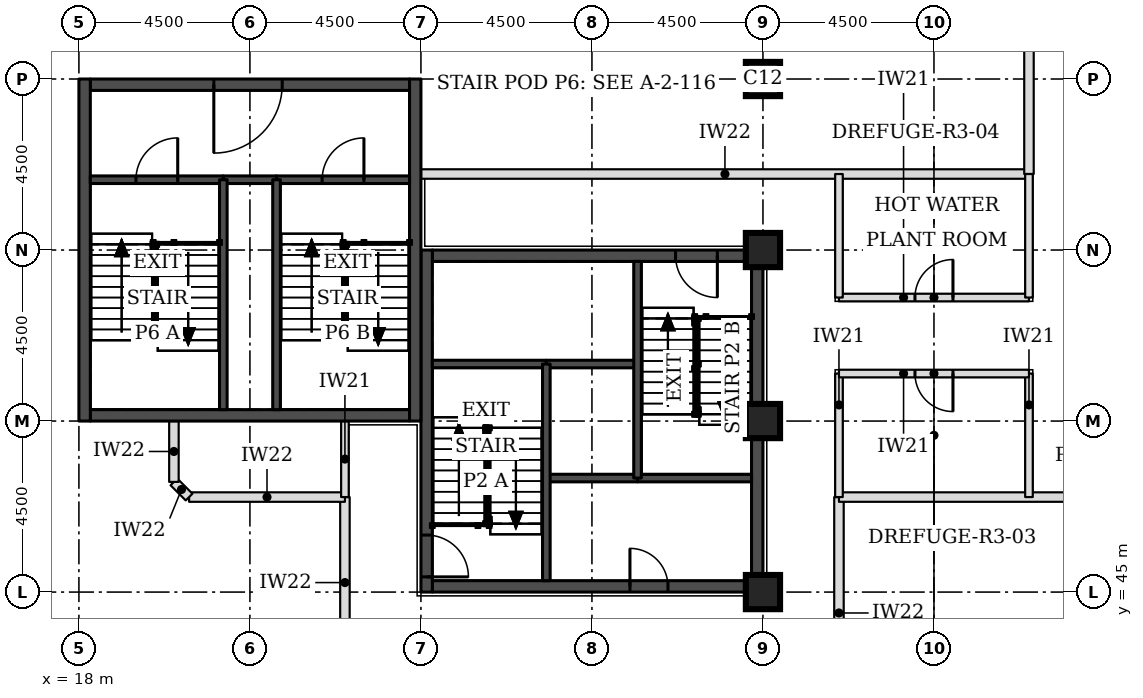
"""IFC4 building model, lengths in metres.
Left out: names, types, materials, properties, quantities, classifications, styles, units other than length and angle.
Written with IfcOpenShell. Run it as: python <this file> out.ifc"""

import sys

from ifc_helpers import new_model, si_unit, direction, frame, frame_2d, origin, origin_2d, place, context, subcontext, project, spatial, rectangle, extrude, element, fill, save


model = new_model("IFC4")
c1 = context("Model", 3, precision=1e-05, world=origin(), true_north=direction((0.0, 1.0)))
c2 = subcontext(c1, "Body", "Model", "MODEL_VIEW")
j1 = project(units=[si_unit("LENGTHUNIT", "METRE"), si_unit("PLANEANGLEUNIT", "RADIAN")], contexts=[c1])
p1 = place(None, origin())
s1 = spatial("IfcSite", under=j1, at=p1, CompositionType="ELEMENT")
p2 = place(p1, origin())
s2 = spatial("IfcBuilding", under=s1, at=p2, CompositionType="ELEMENT")
p3 = place(p2, frame((0.0, 0.0, 206.9)))
s3 = spatial("IfcBuildingStorey", under=s2, at=p3, CompositionType="ELEMENT", Elevation=206.9)
for number, where, z_axis, x_axis in (
    (1, (36.0, 45.0, 0.0), (0.0, 0.0, 1.0), (1.0, 0.0, 0.0)),
    (2, (36.0, 49.5, 0.0), (0.0, 0.0, 1.0), (1.0, 0.0, 0.0)),
    (3, (36.0, 54.0, 0.0), (0.0, 0.0, 1.0), (1.0, 0.0, 0.0)),
    (4, (36.0, 58.5, 0.0), (0.0, 0.0, 1.0), (1.0, 0.0, 0.0)),
):
    element("IfcColumn", number, at=place(p3, frame(where, z_axis=z_axis, x_axis=x_axis)), inside=s3, PredefinedType="COLUMN", context=c2, shape_type="SweptSolid", body=[
        extrude(rectangle(XDim=0.9, YDim=0.9, at=origin_2d()), origin(), (0.0, 0.0, 1.0), 5.0),
    ])
p4 = place(p3, frame((27.3, 45.15, 0.0), z_axis=(0.0, 0.0, 1.0), x_axis=(1.0, 0.0, 0.0)))
e5 = element("IfcWall", 5, at=p4, inside=s3, PredefinedType="SHEAR", context=c2, shape_type="SweptSolid", body=[
    extrude(rectangle(XDim=8.4, YDim=0.3, at=frame_2d((4.2, 0.0))), origin(), (0.0, 0.0, 1.0), 5.0),
])
p5 = place(p4, frame((5.2, 0.0, 0.0)))
e6 = element("IfcOpeningElement", 6, at=p5, cuts=e5, PredefinedType="OPENING", context=c2, shape_type="SweptSolid", body=[
    extrude(rectangle(XDim=1.0, YDim=2.1, at=frame_2d((0.5, 1.05))), frame((0.0, 0.16, 0.0), z_axis=(0.0, -1.0, 0.0), x_axis=(1.0, 0.0, 0.0)), (0.0, 0.0, 1.0), 0.32),
])
p6 = place(p3, frame((27.3, 53.85, 0.0), z_axis=(0.0, 0.0, 1.0), x_axis=(1.0, 0.0, 0.0)))
e7 = element("IfcWall", 7, at=p6, inside=s3, PredefinedType="SHEAR", context=c2, shape_type="SweptSolid", body=[
    extrude(rectangle(XDim=8.4, YDim=0.3, at=frame_2d((4.2, 0.0))), origin(), (0.0, 0.0, 1.0), 5.0),
])
p7 = place(p6, frame((6.4, 0.0, 0.0)))
e8 = element("IfcOpeningElement", 8, at=p7, cuts=e7, PredefinedType="OPENING", context=c2, shape_type="SweptSolid", body=[
    extrude(rectangle(XDim=1.1, YDim=2.1, at=frame_2d((0.55, 1.05))), frame((0.0, 0.16, 0.0), z_axis=(0.0, -1.0, 0.0), x_axis=(1.0, 0.0, 0.0)), (0.0, 0.0, 1.0), 0.32),
])
p8 = place(p3, frame((27.15, 45.0, 0.0), z_axis=(0.0, 0.0, 1.0), x_axis=(0.0, 1.0, 0.0)))
e9 = element("IfcWall", 9, at=p8, inside=s3, PredefinedType="SHEAR", context=c2, shape_type="SweptSolid", body=[
    extrude(rectangle(XDim=9.0, YDim=0.3, at=frame_2d((4.5, 0.0))), origin(), (0.0, 0.0, 1.0), 5.0),
])
p9 = place(p8, frame((0.4, 0.0, 0.0)))
e10 = element("IfcOpeningElement", 10, at=p9, cuts=e9, PredefinedType="OPENING", context=c2, shape_type="SweptSolid", body=[
    extrude(rectangle(XDim=1.1, YDim=2.1, at=frame_2d((0.55, 1.05))), frame((0.0, 0.16, 0.0), z_axis=(0.0, -1.0, 0.0), x_axis=(1.0, 0.0, 0.0)), (0.0, 0.0, 1.0), 0.32),
])
p10 = place(p3, frame((35.85, 45.0, 0.0), z_axis=(0.0, 0.0, 1.0), x_axis=(0.0, 1.0, 0.0)))
e11 = element("IfcWall", 11, at=p10, inside=s3, PredefinedType="SHEAR", context=c2, shape_type="SweptSolid", body=[
    extrude(rectangle(XDim=9.0, YDim=0.3, at=frame_2d((4.5, 0.0))), origin(), (0.0, 0.0, 1.0), 5.0),
])
p11 = place(p3, frame((18.3, 49.65, 0.0), z_axis=(0.0, 0.0, 1.0), x_axis=(1.0, 0.0, 0.0)))
e12 = element("IfcWall", 12, at=p11, inside=s3, PredefinedType="SHEAR", context=c2, shape_type="SweptSolid", body=[
    extrude(rectangle(XDim=8.4, YDim=0.3, at=frame_2d((4.2, 0.0))), origin(), (0.0, 0.0, 1.0), 5.0),
])
p12 = place(p3, frame((18.3, 58.35, 0.0), z_axis=(0.0, 0.0, 1.0), x_axis=(1.0, 0.0, 0.0)))
e13 = element("IfcWall", 13, at=p12, inside=s3, PredefinedType="SHEAR", context=c2, shape_type="SweptSolid", body=[
    extrude(rectangle(XDim=8.4, YDim=0.3, at=frame_2d((4.2, 0.0))), origin(), (0.0, 0.0, 1.0), 5.0),
])
p13 = place(p12, frame((3.25, 0.0, 0.0)))
e14 = element("IfcOpeningElement", 14, at=p13, cuts=e13, PredefinedType="OPENING", context=c2, shape_type="SweptSolid", body=[
    extrude(rectangle(XDim=1.8, YDim=2.1, at=frame_2d((0.9, 1.05))), frame((0.0, 0.16, 0.0), z_axis=(0.0, -1.0, 0.0), x_axis=(1.0, 0.0, 0.0)), (0.0, 0.0, 1.0), 0.32),
])
for number, where, z_axis, x_axis in (
    (15, (18.15, 49.5, 0.0), (0.0, 0.0, 1.0), (0.0, 1.0, 0.0)),
    (16, (26.85, 49.5, 0.0), (0.0, 0.0, 1.0), (0.0, 1.0, 0.0)),
):
    element("IfcWall", number, at=place(p3, frame(where, z_axis=z_axis, x_axis=x_axis)), inside=s3, PredefinedType="SHEAR", context=c2, shape_type="SweptSolid", body=[
        extrude(rectangle(XDim=9.0, YDim=0.3, at=frame_2d((4.5, 0.0))), origin(), (0.0, 0.0, 1.0), 5.0),
    ])
for number, where, z_axis, x_axis in (
    (17, (25.0, 43.0, 0.0), (0.0, 0.0, 1.0), (0.0, 1.0, 0.0)),
    (18, (38.0, 43.0, 0.0), (0.0, 0.0, 1.0), (0.0, 1.0, 0.0)),
):
    element("IfcWall", number, at=place(p3, frame(where, z_axis=z_axis, x_axis=x_axis)), inside=s3, PredefinedType="PARTITIONING", context=c2, shape_type="SweptSolid", body=[
        extrude(rectangle(XDim=4.5, YDim=0.25, at=frame_2d((2.25, 0.0))), origin(), (0.0, 0.0, 1.0), 4.85),
    ])
p14 = place(p3, frame((20.899, 47.5, 0.0), z_axis=(0.0, 0.0, 1.0), x_axis=(1.0, 0.0, 0.0)))
e19 = element("IfcWall", 19, at=p14, inside=s3, PredefinedType="PARTITIONING", context=c2, shape_type="SweptSolid", body=[
    extrude(rectangle(XDim=4.101, YDim=0.25, at=frame_2d((2.051, 0.0))), origin(), (0.0, 0.0, 1.0), 4.85),
])
p15 = place(p3, frame((38.0, 47.5, 0.0), z_axis=(0.0, 0.0, 1.0), x_axis=(1.0, 0.0, 0.0)))
e20 = element("IfcWall", 20, at=p15, inside=s3, PredefinedType="PARTITIONING", context=c2, shape_type="SweptSolid", body=[
    extrude(rectangle(XDim=31.5, YDim=0.25, at=frame_2d((15.75, 0.0))), origin(), (0.0, 0.0, 1.0), 4.85),
])
p16 = place(p3, frame((20.5, 47.899, 0.0), z_axis=(0.0, 0.0, 1.0), x_axis=(0.707106781187, -0.707106781187, 0.0)))
e21 = element("IfcWall", 21, at=p16, inside=s3, PredefinedType="PARTITIONING", context=c2, shape_type="SweptSolid", body=[
    extrude(rectangle(XDim=0.564, YDim=0.25, at=frame_2d((0.282, 0.0))), origin(), (0.0, 0.0, 1.0), 4.85),
])
p17 = place(p3, frame((20.5, 47.899, 0.0), z_axis=(0.0, 0.0, 1.0), x_axis=(0.0, 1.0, 0.0)))
e22 = element("IfcWall", 22, at=p17, inside=s3, PredefinedType="PARTITIONING", context=c2, shape_type="SweptSolid", body=[
    extrude(rectangle(XDim=1.601, YDim=0.25, at=frame_2d((0.801, 0.0))), origin(), (0.0, 0.0, 1.0), 4.85),
])
p18 = place(p3, frame((27.0, 56.0, 0.0), z_axis=(0.0, 0.0, 1.0), x_axis=(1.0, 0.0, 0.0)))
e23 = element("IfcWall", 23, at=p18, inside=s3, PredefinedType="PARTITIONING", context=c2, shape_type="SweptSolid", body=[
    extrude(rectangle(XDim=16.0, YDim=0.25, at=frame_2d((8.0, 0.0))), origin(), (0.0, 0.0, 1.0), 4.85),
])
p19 = place(p3, frame((43.0, 56.0, 0.0), z_axis=(0.0, 0.0, 1.0), x_axis=(0.0, 1.0, 0.0)))
e24 = element("IfcWall", 24, at=p19, inside=s3, PredefinedType="PARTITIONING", context=c2, shape_type="SweptSolid", body=[
    extrude(rectangle(XDim=18.0, YDim=0.25, at=frame_2d((9.0, 0.0))), origin(), (0.0, 0.0, 1.0), 4.85),
])
p20 = place(p3, frame((25.0, 47.5, 0.0), z_axis=(0.0, 0.0, 1.0), x_axis=(0.0, 1.0, 0.0)))
e25 = element("IfcWall", 25, at=p20, inside=s3, PredefinedType="PARTITIONING", context=c2, shape_type="SweptSolid", body=[
    extrude(rectangle(XDim=2.0, YDim=0.2, at=frame_2d((1.0, 0.0))), origin(), (0.0, 0.0, 1.0), 4.85),
])
for number, where, z_axis, x_axis in (
    (26, (38.0, 47.5, 0.0), (0.0, 0.0, 1.0), (0.0, 1.0, 0.0)),
    (27, (43.0, 47.5, 0.0), (0.0, 0.0, 1.0), (0.0, 1.0, 0.0)),
):
    element("IfcWall", number, at=place(p3, frame(where, z_axis=z_axis, x_axis=x_axis)), inside=s3, PredefinedType="PARTITIONING", context=c2, shape_type="SweptSolid", body=[
        extrude(rectangle(XDim=3.25, YDim=0.2, at=frame_2d((1.625, 0.0))), origin(), (0.0, 0.0, 1.0), 4.85),
    ])
p21 = place(p3, frame((38.0, 50.75, 0.0), z_axis=(0.0, 0.0, 1.0), x_axis=(1.0, 0.0, 0.0)))
e28 = element("IfcWall", 28, at=p21, inside=s3, PredefinedType="PARTITIONING", context=c2, shape_type="SweptSolid", body=[
    extrude(rectangle(XDim=5.0, YDim=0.2, at=frame_2d((2.5, 0.0))), origin(), (0.0, 0.0, 1.0), 4.85),
])
p22 = place(p21, frame((2.0, 0.0, 0.0)))
e29 = element("IfcOpeningElement", 29, at=p22, cuts=e28, PredefinedType="OPENING", context=c2, shape_type="SweptSolid", body=[
    extrude(rectangle(XDim=1.0, YDim=2.1, at=frame_2d((0.5, 1.05))), frame((0.0, 0.11, 0.0), z_axis=(0.0, -1.0, 0.0), x_axis=(1.0, 0.0, 0.0)), (0.0, 0.0, 1.0), 0.22),
])
p23 = place(p3, frame((38.0, 52.75, 0.0), z_axis=(0.0, 0.0, 1.0), x_axis=(1.0, 0.0, 0.0)))
e30 = element("IfcWall", 30, at=p23, inside=s3, PredefinedType="PARTITIONING", context=c2, shape_type="SweptSolid", body=[
    extrude(rectangle(XDim=5.0, YDim=0.2, at=frame_2d((2.5, 0.0))), origin(), (0.0, 0.0, 1.0), 4.85),
])
p24 = place(p23, frame((2.0, 0.0, 0.0)))
e31 = element("IfcOpeningElement", 31, at=p24, cuts=e30, PredefinedType="OPENING", context=c2, shape_type="SweptSolid", body=[
    extrude(rectangle(XDim=1.0, YDim=2.1, at=frame_2d((0.5, 1.05))), frame((0.0, 0.11, 0.0), z_axis=(0.0, -1.0, 0.0), x_axis=(1.0, 0.0, 0.0)), (0.0, 0.0, 1.0), 0.22),
])
for number, where, z_axis, x_axis in (
    (32, (38.0, 52.75, 0.0), (0.0, 0.0, 1.0), (0.0, 1.0, 0.0)),
    (33, (43.0, 52.75, 0.0), (0.0, 0.0, 1.0), (0.0, 1.0, 0.0)),
):
    element("IfcWall", number, at=place(p3, frame(where, z_axis=z_axis, x_axis=x_axis)), inside=s3, PredefinedType="PARTITIONING", context=c2, shape_type="SweptSolid", body=[
        extrude(rectangle(XDim=3.25, YDim=0.2, at=frame_2d((1.625, 0.0))), origin(), (0.0, 0.0, 1.0), 4.85),
    ])
p25 = place(p3, frame((30.3, 48.0, 0.0), z_axis=(0.0, 0.0, 1.0), x_axis=(1.0, 0.0, 0.0)))
e34 = element("IfcWall", 34, at=p25, inside=s3, PredefinedType="SOLIDWALL", context=c2, shape_type="SweptSolid", body=[
    extrude(rectangle(XDim=2.4, YDim=0.2, at=frame_2d((1.2, 0.0))), origin(), (0.0, 0.0, 1.0), 4.85),
])
p26 = place(p3, frame((32.7, 48.0, 0.0), z_axis=(0.0, 0.0, 1.0), x_axis=(1.0, 0.0, 0.0)))
e35 = element("IfcWall", 35, at=p26, inside=s3, PredefinedType="SOLIDWALL", context=c2, shape_type="SweptSolid", body=[
    extrude(rectangle(XDim=3.0, YDim=0.2, at=frame_2d((1.5, 0.0))), origin(), (0.0, 0.0, 1.0), 4.85),
])
p27 = place(p3, frame((30.3, 51.0, 0.0), z_axis=(0.0, 0.0, 1.0), x_axis=(1.0, 0.0, 0.0)))
e36 = element("IfcWall", 36, at=p27, inside=s3, PredefinedType="SOLIDWALL", context=c2, shape_type="SweptSolid", body=[
    extrude(rectangle(XDim=2.4, YDim=0.2, at=frame_2d((1.2, 0.0))), origin(), (0.0, 0.0, 1.0), 5.0),
])
p28 = place(p3, frame((27.3, 51.0, 0.0), z_axis=(0.0, 0.0, 1.0), x_axis=(1.0, 0.0, 0.0)))
e37 = element("IfcWall", 37, at=p28, inside=s3, PredefinedType="SOLIDWALL", context=c2, shape_type="SweptSolid", body=[
    extrude(rectangle(XDim=3.0, YDim=0.2, at=frame_2d((1.5, 0.0))), origin(), (0.0, 0.0, 1.0), 4.85),
])
for number, where, z_axis, x_axis in (
    (38, (30.3, 45.3, 0.0), (0.0, 0.0, 1.0), (0.0, 1.0, 0.0)),
    (39, (32.7, 48.0, 0.0), (0.0, 0.0, 1.0), (0.0, 1.0, 0.0)),
):
    element("IfcWall", number, at=place(p3, frame(where, z_axis=z_axis, x_axis=x_axis)), inside=s3, PredefinedType="SOLIDWALL", context=c2, shape_type="SweptSolid", body=[
        extrude(rectangle(XDim=5.7, YDim=0.2, at=frame_2d((2.85, 0.0))), origin(), (0.0, 0.0, 1.0), 4.85),
    ])
p29 = place(p3, frame((21.8, 55.85, 0.0), z_axis=(0.0, 0.0, 1.0), x_axis=(1.0, 0.0, 0.0)))
e40 = element("IfcWall", 40, at=p29, inside=s3, PredefinedType="SOLIDWALL", context=c2, shape_type="SweptSolid", body=[
    extrude(rectangle(XDim=1.4, YDim=0.2, at=frame_2d((0.7, 0.0))), origin(), (0.0, 0.0, 1.0), 4.85),
])
p30 = place(p3, frame((18.3, 55.85, 0.0), z_axis=(0.0, 0.0, 1.0), x_axis=(1.0, 0.0, 0.0)))
e41 = element("IfcWall", 41, at=p30, inside=s3, PredefinedType="SOLIDWALL", context=c2, shape_type="SweptSolid", body=[
    extrude(rectangle(XDim=3.5, YDim=0.2, at=frame_2d((1.75, 0.0))), origin(), (0.0, 0.0, 1.0), 4.85),
])
p31 = place(p30, frame((1.2, 0.0, 0.0)))
e42 = element("IfcOpeningElement", 42, at=p31, cuts=e41, PredefinedType="OPENING", context=c2, shape_type="SweptSolid", body=[
    extrude(rectangle(XDim=1.1, YDim=2.1, at=frame_2d((0.55, 1.05))), frame((0.0, 0.11, 0.0), z_axis=(0.0, -1.0, 0.0), x_axis=(1.0, 0.0, 0.0)), (0.0, 0.0, 1.0), 0.22),
])
p32 = place(p3, frame((23.2, 55.85, 0.0), z_axis=(0.0, 0.0, 1.0), x_axis=(1.0, 0.0, 0.0)))
e43 = element("IfcWall", 43, at=p32, inside=s3, PredefinedType="SOLIDWALL", context=c2, shape_type="SweptSolid", body=[
    extrude(rectangle(XDim=3.5, YDim=0.2, at=frame_2d((1.75, 0.0))), origin(), (0.0, 0.0, 1.0), 4.85),
])
p33 = place(p32, frame((1.2, 0.0, 0.0)))
e44 = element("IfcOpeningElement", 44, at=p33, cuts=e43, PredefinedType="OPENING", context=c2, shape_type="SweptSolid", body=[
    extrude(rectangle(XDim=1.1, YDim=2.1, at=frame_2d((0.55, 1.05))), frame((0.0, 0.11, 0.0), z_axis=(0.0, -1.0, 0.0), x_axis=(1.0, 0.0, 0.0)), (0.0, 0.0, 1.0), 0.22),
])
for number, where, z_axis, x_axis in (
    (45, (21.8, 49.8, 0.0), (0.0, 0.0, 1.0), (0.0, 1.0, 0.0)),
    (46, (23.2, 49.8, 0.0), (0.0, 0.0, 1.0), (0.0, 1.0, 0.0)),
):
    element("IfcWall", number, at=place(p3, frame(where, z_axis=z_axis, x_axis=x_axis)), inside=s3, PredefinedType="SOLIDWALL", context=c2, shape_type="SweptSolid", body=[
        extrude(rectangle(XDim=6.05, YDim=0.2, at=frame_2d((3.025, 0.0))), origin(), (0.0, 0.0, 1.0), 4.85),
    ])
p34 = place(p22, frame((1.0, 0.0, 0.0), z_axis=(0.0, 0.0, 1.0), x_axis=(-1.0, 0.0, 0.0)))
e47 = element("IfcDoor", 47, at=p34, inside=s3, OperationType="SINGLE_SWING_LEFT", PredefinedType="DOOR", context=c2, shape_type="SweptSolid", body=[
    extrude(rectangle(XDim=1.0, YDim=2.1, at=frame_2d((0.5, 1.05))), frame((0.0, 0.025, 0.0), z_axis=(0.0, -1.0, 0.0), x_axis=(1.0, 0.0, 0.0)), (0.0, 0.0, 1.0), 0.05),
])
fill(e29, e47)
p35 = place(p24, origin())
e48 = element("IfcDoor", 48, at=p35, inside=s3, OperationType="SINGLE_SWING_RIGHT", PredefinedType="DOOR", context=c2, shape_type="SweptSolid", body=[
    extrude(rectangle(XDim=1.0, YDim=2.1, at=frame_2d((0.5, 1.05))), frame((0.0, 0.025, 0.0), z_axis=(0.0, -1.0, 0.0), x_axis=(1.0, 0.0, 0.0)), (0.0, 0.0, 1.0), 0.05),
])
fill(e31, e48)
p36 = place(p9, frame((1.1, 0.0, 0.0), z_axis=(0.0, 0.0, 1.0), x_axis=(-1.0, 0.0, 0.0)))
e49 = element("IfcDoor", 49, at=p36, inside=s3, OperationType="SINGLE_SWING_RIGHT", PredefinedType="DOOR", context=c2, shape_type="SweptSolid", body=[
    extrude(rectangle(XDim=1.1, YDim=2.1, at=frame_2d((0.55, 1.05))), frame((0.0, 0.025, 0.0), z_axis=(0.0, -1.0, 0.0), x_axis=(1.0, 0.0, 0.0)), (0.0, 0.0, 1.0), 0.05),
])
fill(e10, e49)
p37 = place(p7, frame((1.1, 0.0, 0.0), z_axis=(0.0, 0.0, 1.0), x_axis=(-1.0, 0.0, 0.0)))
e50 = element("IfcDoor", 50, at=p37, inside=s3, OperationType="SINGLE_SWING_LEFT", PredefinedType="DOOR", context=c2, shape_type="SweptSolid", body=[
    extrude(rectangle(XDim=1.1, YDim=2.1, at=frame_2d((0.55, 1.05))), frame((0.0, 0.025, 0.0), z_axis=(0.0, -1.0, 0.0), x_axis=(1.0, 0.0, 0.0)), (0.0, 0.0, 1.0), 0.05),
])
fill(e8, e50)
p38 = place(p5, origin())
e51 = element("IfcDoor", 51, at=p38, inside=s3, OperationType="SINGLE_SWING_LEFT", PredefinedType="DOOR", context=c2, shape_type="SweptSolid", body=[
    extrude(rectangle(XDim=1.0, YDim=2.1, at=frame_2d((0.5, 1.05))), frame((0.0, 0.025, 0.0), z_axis=(0.0, -1.0, 0.0), x_axis=(1.0, 0.0, 0.0)), (0.0, 0.0, 1.0), 0.05),
])
fill(e6, e51)
p39 = place(p31, origin())
e52 = element("IfcDoor", 52, at=p39, inside=s3, OperationType="SINGLE_SWING_RIGHT", PredefinedType="DOOR", context=c2, shape_type="SweptSolid", body=[
    extrude(rectangle(XDim=1.1, YDim=2.1, at=frame_2d((0.55, 1.05))), frame((0.0, 0.025, 0.0), z_axis=(0.0, -1.0, 0.0), x_axis=(1.0, 0.0, 0.0)), (0.0, 0.0, 1.0), 0.05),
])
fill(e42, e52)
p40 = place(p33, origin())
e53 = element("IfcDoor", 53, at=p40, inside=s3, OperationType="SINGLE_SWING_RIGHT", PredefinedType="DOOR", context=c2, shape_type="SweptSolid", body=[
    extrude(rectangle(XDim=1.1, YDim=2.1, at=frame_2d((0.55, 1.05))), frame((0.0, 0.025, 0.0), z_axis=(0.0, -1.0, 0.0), x_axis=(1.0, 0.0, 0.0)), (0.0, 0.0, 1.0), 0.05),
])
fill(e44, e53)
p41 = place(p13, frame((1.8, 0.0, 0.0), z_axis=(0.0, 0.0, 1.0), x_axis=(-1.0, 0.0, 0.0)))
e54 = element("IfcDoor", 54, at=p41, inside=s3, OperationType="SINGLE_SWING_RIGHT", PredefinedType="DOOR", context=c2, shape_type="SweptSolid", body=[
    extrude(rectangle(XDim=1.8, YDim=2.1, at=frame_2d((0.9, 1.05))), frame((0.0, 0.025, 0.0), z_axis=(0.0, -1.0, 0.0), x_axis=(1.0, 0.0, 0.0)), (0.0, 0.0, 1.0), 0.05),
])
fill(e14, e54)
save(model, sys.argv[1])
